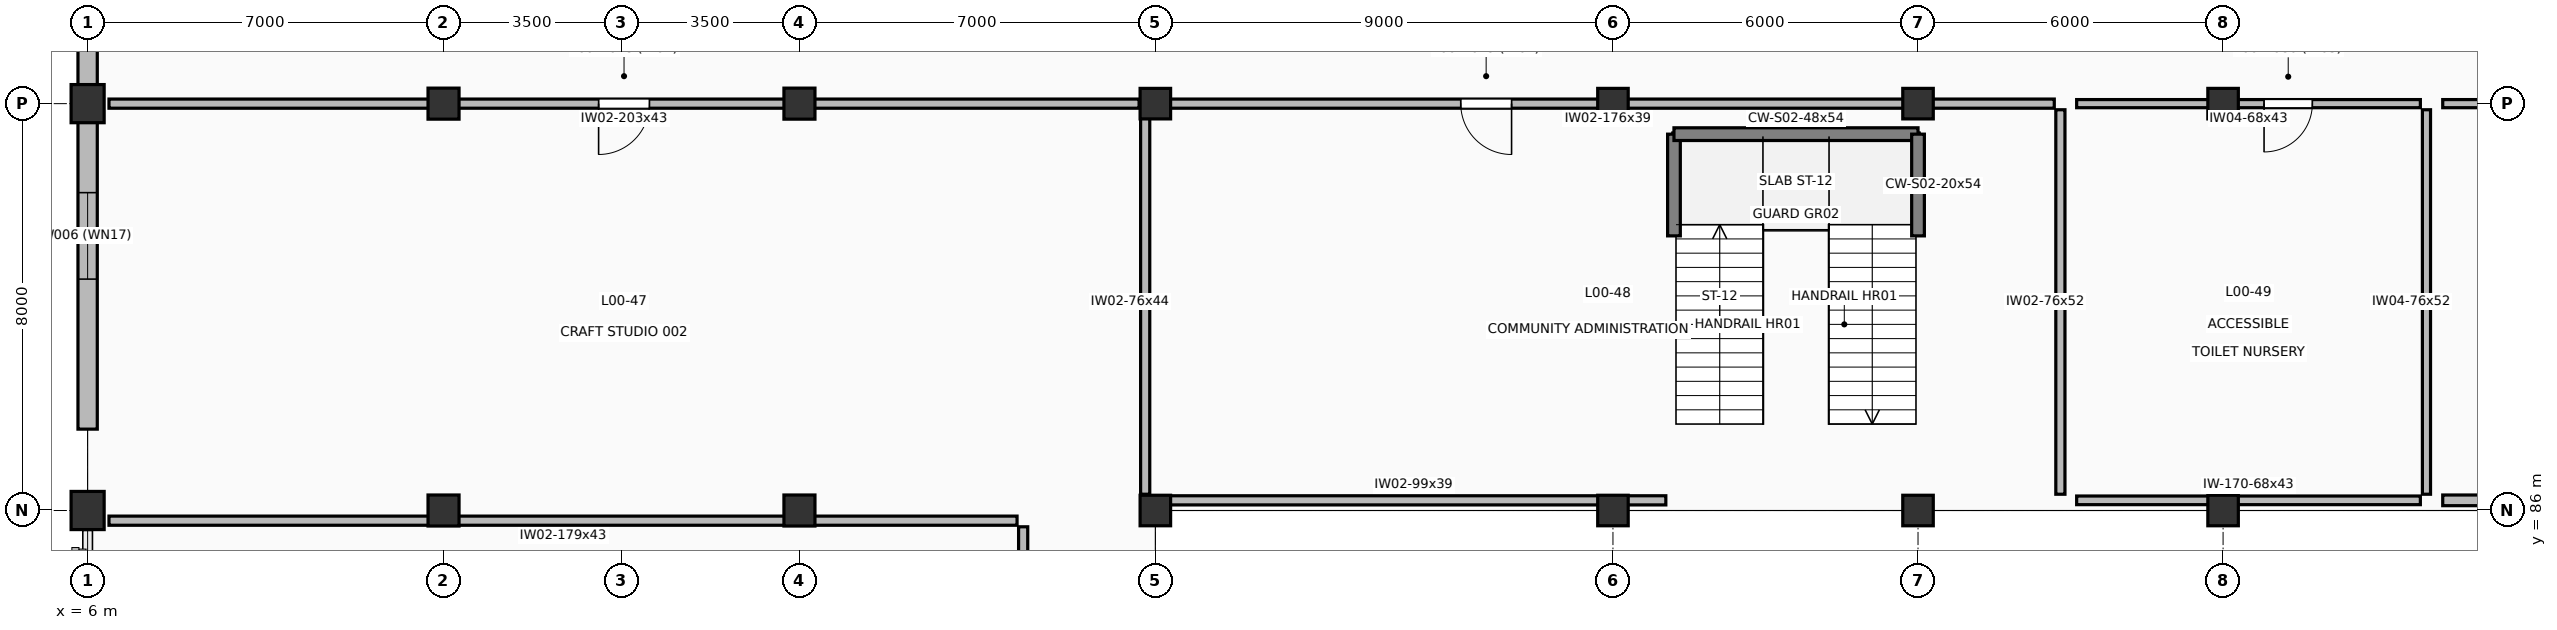
"""IFC4 building model, lengths in metres.
Left out: names, types, materials, properties, quantities, classifications, styles, units other than length and angle.
Written with IfcOpenShell. Run it as: python <this file> out.ifc"""

import sys

from ifc_helpers import new_model, si_unit, direction, frame, frame_2d, origin, origin_2d, place, context, subcontext, project, spatial, rectangle, extrude, element, fill, save


model = new_model("IFC4")
c1 = context("Model", 3, precision=1e-05, world=origin(), true_north=direction((0.0, 1.0)))
c2 = subcontext(c1, "Body", "Model", "MODEL_VIEW")
j1 = project(units=[si_unit("LENGTHUNIT", "METRE"), si_unit("PLANEANGLEUNIT", "RADIAN")], contexts=[c1])
p1 = place(None, origin())
s1 = spatial("IfcSite", under=j1, at=p1, CompositionType="ELEMENT")
p2 = place(p1, origin())
s2 = spatial("IfcBuilding", under=s1, at=p2, CompositionType="ELEMENT")
p3 = place(p2, origin())
s3 = spatial("IfcBuildingStorey", under=s2, at=p3, CompositionType="ELEMENT", Elevation=0.0)
for number, where, z_axis, x_axis in (
    (1, (6.0, 86.0, 0.0), (0.0, 0.0, 1.0), (1.0, 0.0, 0.0)),
    (2, (6.0, 94.0, 0.0), (0.0, 0.0, 1.0), (1.0, 0.0, 0.0)),
):
    element("IfcColumn", number, at=place(p3, frame(where, z_axis=z_axis, x_axis=x_axis)), inside=s3, PredefinedType="PILASTER", context=c2, shape_type="SweptSolid", body=[
        extrude(rectangle(XDim=0.65, YDim=0.75, at=origin_2d()), origin(), (0.0, 0.0, 1.0), 5.4),
    ])
for number, where, z_axis, x_axis in (
    (3, (13.0, 86.0, 0.0), (0.0, 0.0, 1.0), (1.0, 0.0, 0.0)),
    (4, (13.0, 94.0, 0.0), (0.0, 0.0, 1.0), (1.0, 0.0, 0.0)),
    (5, (20.0, 86.0, 0.0), (0.0, 0.0, 1.0), (1.0, 0.0, 0.0)),
    (6, (20.0, 94.0, 0.0), (0.0, 0.0, 1.0), (1.0, 0.0, 0.0)),
):
    element("IfcColumn", number, at=place(p3, frame(where, z_axis=z_axis, x_axis=x_axis)), inside=s3, PredefinedType="COLUMN", context=c2, shape_type="SweptSolid", body=[
        extrude(rectangle(XDim=0.61, YDim=0.61, at=origin_2d()), origin(), (0.0, 0.0, 1.0), 5.4),
    ])
for number, where, z_axis, x_axis in (
    (7, (27.0, 86.0, 0.0), (0.0, 0.0, 1.0), (1.0, 0.0, 0.0)),
    (8, (27.0, 94.0, 0.0), (0.0, 0.0, 1.0), (1.0, 0.0, 0.0)),
    (9, (36.0, 86.0, 0.0), (0.0, 0.0, 1.0), (1.0, 0.0, 0.0)),
    (10, (36.0, 94.0, 0.0), (0.0, 0.0, 1.0), (1.0, 0.0, 0.0)),
    (11, (42.0, 86.0, 0.0), (0.0, 0.0, 1.0), (1.0, 0.0, 0.0)),
    (12, (42.0, 94.0, 0.0), (0.0, 0.0, 1.0), (1.0, 0.0, 0.0)),
    (13, (48.0, 86.0, 0.0), (0.0, 0.0, 1.0), (1.0, 0.0, 0.0)),
    (14, (48.0, 94.0, 0.0), (0.0, 0.0, 1.0), (1.0, 0.0, 0.0)),
):
    element("IfcColumn", number, at=place(p3, frame(where, z_axis=z_axis, x_axis=x_axis)), inside=s3, PredefinedType="COLUMN", context=c2, shape_type="SweptSolid", body=[
        extrude(rectangle(XDim=0.6, YDim=0.6, at=origin_2d()), origin(), (0.0, 0.0, 1.0), 5.4),
    ])
p4 = place(p3, frame((6.0, 87.6, 0.0), z_axis=(0.0, 0.0, 1.0), x_axis=(0.0, 1.0, 0.0)))
e15 = element("IfcWall", 15, at=p4, inside=s3, PredefinedType="SOLIDWALL", context=c2, shape_type="SweptSolid", body=[
    extrude(rectangle(XDim=7.6, YDim=0.38, at=frame_2d((3.8, 0.0))), origin(), (0.0, 0.0, 1.0), 4.445),
])
p5 = place(p4, frame((2.95, 0.0, 1.8)))
e16 = element("IfcOpeningElement", 16, at=p5, cuts=e15, PredefinedType="OPENING", context=c2, shape_type="SweptSolid", body=[
    extrude(rectangle(XDim=1.7, YDim=1.1, at=frame_2d((0.85, 0.55))), frame((0.0, 0.2, 0.0), z_axis=(0.0, -1.0, 0.0), x_axis=(1.0, 0.0, 0.0)), (0.0, 0.0, 1.0), 0.4),
])
p6 = place(p3, frame((37.2, 91.4, 0.0), z_axis=(0.0, 0.0, 1.0), x_axis=(0.0, 1.0, 0.0)))
e17 = element("IfcWall", 17, at=p6, inside=s3, PredefinedType="SHEAR", context=c2, shape_type="SweptSolid", body=[
    extrude(rectangle(XDim=2.0, YDim=0.25, at=frame_2d((1.0, 0.0))), origin(), (0.0, 0.0, 1.0), 5.4),
])
p7 = place(p3, frame((37.2, 93.4, 0.0), z_axis=(0.0, 0.0, 1.0), x_axis=(1.0, 0.0, 0.0)))
e18 = element("IfcWall", 18, at=p7, inside=s3, PredefinedType="SHEAR", context=c2, shape_type="SweptSolid", body=[
    extrude(rectangle(XDim=4.8, YDim=0.25, at=frame_2d((2.4, 0.0))), origin(), (0.0, 0.0, 1.0), 5.4),
])
p8 = place(p3, frame((42.0, 93.4, 0.0), z_axis=(0.0, 0.0, 1.0), x_axis=(0.0, -1.0, 0.0)))
e19 = element("IfcWall", 19, at=p8, inside=s3, PredefinedType="SHEAR", context=c2, shape_type="SweptSolid", body=[
    extrude(rectangle(XDim=2.0, YDim=0.25, at=frame_2d((1.0, 0.0))), origin(), (0.0, 0.0, 1.0), 5.4),
])
p9 = place(p3, frame((24.28, 85.8, 0.0), z_axis=(0.0, 0.0, 1.0), x_axis=(-1.0, 0.0, 0.0)))
e20 = element("IfcWall", 20, at=p9, inside=s3, PredefinedType="PARTITIONING", context=c2, shape_type="SweptSolid", body=[
    extrude(rectangle(XDim=17.86, YDim=0.18, at=frame_2d((8.93, 0.0))), origin(), (0.0, 0.0, 1.0), 4.315),
])
p10 = place(p3, frame((24.4, 78.42, 0.0), z_axis=(0.0, 0.0, 1.0), x_axis=(0.0, 1.0, 0.0)))
e21 = element("IfcWall", 21, at=p10, inside=s3, PredefinedType="PARTITIONING", context=c2, shape_type="SweptSolid", body=[
    extrude(rectangle(XDim=7.26, YDim=0.18, at=frame_2d((3.63, 0.0))), origin(), (0.0, 0.0, 1.0), 5.16),
])
p11 = place(p10, frame((3.13, 0.0, 0.0)))
e22 = element("IfcOpeningElement", 22, at=p11, cuts=e21, PredefinedType="OPENING", context=c2, shape_type="SweptSolid", body=[
    extrude(rectangle(XDim=1.0, YDim=2.15, at=frame_2d((0.5, 1.075))), frame((0.0, 0.1, 0.0), z_axis=(0.0, -1.0, 0.0), x_axis=(1.0, 0.0, 0.0)), (0.0, 0.0, 1.0), 0.2),
])
p12 = place(p3, frame((26.68, 94.0, 0.0), z_axis=(0.0, 0.0, 1.0), x_axis=(-1.0, 0.0, 0.0)))
e23 = element("IfcWall", 23, at=p12, inside=s3, PredefinedType="PARTITIONING", context=c2, shape_type="SweptSolid", body=[
    extrude(rectangle(XDim=20.26, YDim=0.18, at=frame_2d((10.13, 0.0))), origin(), (0.0, 0.0, 1.0), 4.315),
])
p13 = place(p12, frame((9.63, 0.0, 0.0)))
e24 = element("IfcOpeningElement", 24, at=p13, cuts=e23, PredefinedType="OPENING", context=c2, shape_type="SweptSolid", body=[
    extrude(rectangle(XDim=1.0, YDim=2.15, at=frame_2d((0.5, 1.075))), frame((0.0, 0.1, 0.0), z_axis=(0.0, -1.0, 0.0), x_axis=(1.0, 0.0, 0.0)), (0.0, 0.0, 1.0), 0.2),
])
p14 = place(p3, frame((26.8, 86.32, 0.0), z_axis=(0.0, 0.0, 1.0), x_axis=(0.0, 1.0, 0.0)))
e25 = element("IfcWall", 25, at=p14, inside=s3, PredefinedType="PARTITIONING", context=c2, shape_type="SweptSolid", body=[
    extrude(rectangle(XDim=7.56, YDim=0.18, at=frame_2d((3.78, 0.0))), origin(), (0.0, 0.0, 1.0), 4.445),
])
p15 = place(p3, frame((27.12, 86.2, 0.0), z_axis=(0.0, 0.0, 1.0), x_axis=(1.0, 0.0, 0.0)))
e26 = element("IfcWall", 26, at=p15, inside=s3, PredefinedType="PARTITIONING", context=c2, shape_type="SweptSolid", body=[
    extrude(rectangle(XDim=9.92, YDim=0.18, at=frame_2d((4.96, 0.0))), origin(), (0.0, 0.0, 1.0), 3.945),
])
p16 = place(p3, frame((44.68, 94.0, 0.0), z_axis=(0.0, 0.0, 1.0), x_axis=(-1.0, 0.0, 0.0)))
e27 = element("IfcWall", 27, at=p16, inside=s3, PredefinedType="PARTITIONING", context=c2, shape_type="SweptSolid", body=[
    extrude(rectangle(XDim=17.56, YDim=0.18, at=frame_2d((8.78, 0.0))), origin(), (0.0, 0.0, 1.0), 3.945),
])
p17 = place(p16, frame((10.674, 0.0, 0.0)))
e28 = element("IfcOpeningElement", 28, at=p17, cuts=e27, PredefinedType="OPENING", context=c2, shape_type="SweptSolid", body=[
    extrude(rectangle(XDim=1.0, YDim=2.15, at=frame_2d((0.5, 1.075))), frame((0.0, 0.1, 0.0), z_axis=(0.0, -1.0, 0.0), x_axis=(1.0, 0.0, 0.0)), (0.0, 0.0, 1.0), 0.2),
])
p18 = place(p3, frame((44.8, 86.32, 0.0), z_axis=(0.0, 0.0, 1.0), x_axis=(0.0, 1.0, 0.0)))
e29 = element("IfcWall", 29, at=p18, inside=s3, PredefinedType="PARTITIONING", context=c2, shape_type="SweptSolid", body=[
    extrude(rectangle(XDim=7.56, YDim=0.18, at=frame_2d((3.78, 0.0))), origin(), (0.0, 0.0, 1.0), 5.16),
])
p19 = place(p3, frame((51.88, 94.0, 0.0), z_axis=(0.0, 0.0, 1.0), x_axis=(-1.0, 0.0, 0.0)))
e30 = element("IfcWall", 30, at=p19, inside=s3, PredefinedType="PLUMBINGWALL", context=c2, shape_type="SweptSolid", body=[
    extrude(rectangle(XDim=6.76, YDim=0.16, at=frame_2d((3.38, 0.0))), origin(), (0.0, 0.0, 1.0), 4.315),
])
p20 = place(p19, frame((2.124, 0.0, 0.0)))
e31 = element("IfcOpeningElement", 31, at=p20, cuts=e30, PredefinedType="OPENING", context=c2, shape_type="SweptSolid", body=[
    extrude(rectangle(XDim=0.95, YDim=2.15, at=frame_2d((0.475, 1.075))), frame((0.0, 0.09, 0.0), z_axis=(0.0, -1.0, 0.0), x_axis=(1.0, 0.0, 0.0)), (0.0, 0.0, 1.0), 0.18),
])
p21 = place(p3, frame((52.0, 86.32, 0.0), z_axis=(0.0, 0.0, 1.0), x_axis=(0.0, 1.0, 0.0)))
e32 = element("IfcWall", 32, at=p21, inside=s3, PredefinedType="PLUMBINGWALL", context=c2, shape_type="SweptSolid", body=[
    extrude(rectangle(XDim=7.56, YDim=0.16, at=frame_2d((3.78, 0.0))), origin(), (0.0, 0.0, 1.0), 5.16),
])
p22 = place(p3, frame((45.12, 86.2, 0.0), z_axis=(0.0, 0.0, 1.0), x_axis=(1.0, 0.0, 0.0)))
e33 = element("IfcWall", 33, at=p22, inside=s3, PredefinedType="PARTITIONING", context=c2, shape_type="SweptSolid", body=[
    extrude(rectangle(XDim=6.76, YDim=0.17, at=frame_2d((3.38, 0.0))), origin(), (0.0, 0.0, 1.0), 4.315),
])
p23 = place(p3, frame((59.68, 94.0, 0.0), z_axis=(0.0, 0.0, 1.0), x_axis=(-1.0, 0.0, 0.0)))
e34 = element("IfcWall", 34, at=p23, inside=s3, PredefinedType="PLUMBINGWALL", context=c2, shape_type="SweptSolid", body=[
    extrude(rectangle(XDim=7.36, YDim=0.16, at=frame_2d((3.68, 0.0))), origin(), (0.0, 0.0, 1.0), 4.315),
])
p24 = place(p23, frame((3.205, 0.0, 0.0)))
e35 = element("IfcOpeningElement", 35, at=p24, cuts=e34, PredefinedType="OPENING", context=c2, shape_type="SweptSolid", body=[
    extrude(rectangle(XDim=0.95, YDim=2.15, at=frame_2d((0.475, 1.075))), frame((0.0, 0.09, 0.0), z_axis=(0.0, -1.0, 0.0), x_axis=(1.0, 0.0, 0.0)), (0.0, 0.0, 1.0), 0.18),
])
p25 = place(p3, frame((52.32, 86.2, 0.0), z_axis=(0.0, 0.0, 1.0), x_axis=(1.0, 0.0, 0.0)))
e36 = element("IfcWall", 36, at=p25, inside=s3, PredefinedType="PARTITIONING", context=c2, shape_type="SweptSolid", body=[
    extrude(rectangle(XDim=7.36, YDim=0.21, at=frame_2d((3.68, 0.0))), origin(), (0.0, 0.0, 1.0), 4.315),
])
p26 = place(p5, origin())
e37 = element("IfcWindow", 37, at=p26, inside=s3, PartitioningType="SINGLE_PANEL", PredefinedType="WINDOW", context=c2, shape_type="SweptSolid", body=[
    extrude(rectangle(XDim=1.7, YDim=1.1, at=frame_2d((0.85, 0.55))), frame((0.0, 0.03, 0.0), z_axis=(0.0, -1.0, 0.0), x_axis=(1.0, 0.0, 0.0)), (0.0, 0.0, 1.0), 0.06),
])
fill(e16, e37)
p27 = place(p13, origin())
e38 = element("IfcDoor", 38, at=p27, inside=s3, OperationType="SINGLE_SWING_RIGHT", PredefinedType="DOOR", context=c2, shape_type="SweptSolid", body=[
    extrude(rectangle(XDim=1.0, YDim=2.15, at=frame_2d((0.5, 1.075))), frame((0.0, 0.025, 0.0), z_axis=(0.0, -1.0, 0.0), x_axis=(1.0, 0.0, 0.0)), (0.0, 0.0, 1.0), 0.05),
])
fill(e24, e38)
p28 = place(p17, origin())
e39 = element("IfcDoor", 39, at=p28, inside=s3, OperationType="SINGLE_SWING_LEFT", PredefinedType="DOOR", context=c2, shape_type="SweptSolid", body=[
    extrude(rectangle(XDim=1.0, YDim=2.15, at=frame_2d((0.5, 1.075))), frame((0.0, 0.025, 0.0), z_axis=(0.0, -1.0, 0.0), x_axis=(1.0, 0.0, 0.0)), (0.0, 0.0, 1.0), 0.05),
])
fill(e28, e39)
p29 = place(p20, origin())
e40 = element("IfcDoor", 40, at=p29, inside=s3, OperationType="SINGLE_SWING_RIGHT", PredefinedType="DOOR", context=c2, shape_type="SweptSolid", body=[
    extrude(rectangle(XDim=0.95, YDim=2.15, at=frame_2d((0.475, 1.075))), frame((0.0, 0.025, 0.0), z_axis=(0.0, -1.0, 0.0), x_axis=(1.0, 0.0, 0.0)), (0.0, 0.0, 1.0), 0.05),
])
fill(e31, e40)
save(model, sys.argv[1])
